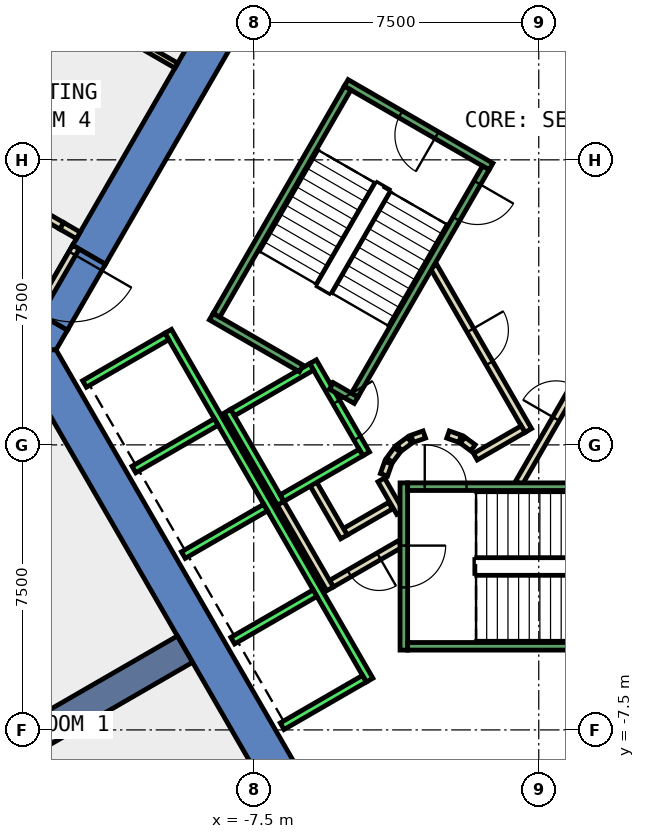
"""IFC4 building model, lengths in metres.
Left out: names, types, materials, properties, quantities, classifications, styles, units other than length and angle.
Written with IfcOpenShell. Run it as: python <this file> out.ifc"""

import sys

from ifc_helpers import new_model, si_unit, direction, frame, frame_2d, origin, place, context, subcontext, project, spatial, polyline, rectangle, outline, extrude, element, fill, save


model = new_model("IFC4")
c1 = context("Model", 3, precision=1e-05, world=origin(), true_north=direction((0.0, 1.0)))
c2 = subcontext(c1, "Body", "Model", "MODEL_VIEW")
j1 = project(units=[si_unit("LENGTHUNIT", "METRE"), si_unit("PLANEANGLEUNIT", "RADIAN")], contexts=[c1])
p1 = place(None, origin())
s1 = spatial("IfcSite", under=j1, at=p1, CompositionType="ELEMENT")
p2 = place(p1, origin())
s2 = spatial("IfcBuilding", under=s1, at=p2, CompositionType="ELEMENT")
p3 = place(p2, frame((0.0, 0.0, 39.2)))
s3 = spatial("IfcBuildingStorey", under=s2, at=p3, CompositionType="ELEMENT", Elevation=39.2)
p4 = place(p3, frame((0.0, 0.0, -0.4)))
e1 = element("IfcWall", 1, at=p4, inside=s3, PredefinedType="SHEAR", context=c2, shape_type="SweptSolid", body=[
    extrude(outline(polyline([(-12.267, 5.252), (-11.402, 4.752), (-6.351, 13.5), (-6.928, 14.5), (-12.267, 5.252)])), origin(), (0.0, 0.0, 1.0), 4.2),
])
p5 = place(p3, frame((0.0, 0.0, -0.4)))
e2 = element("IfcWall", 2, at=p5, inside=s3, PredefinedType="SHEAR", context=c2, shape_type="SweptSolid", body=[
    extrude(outline(polyline([(-12.402, 3.02), (-13.267, 3.52), (-13.856, 2.5), (-12.702, 2.5), (-12.402, 3.02)])), origin(), (0.0, 0.0, 1.0), 4.2),
])
p6 = place(p3, frame((0.0, 0.0, 3.6)))
e3 = element("IfcWall", 3, at=p6, inside=s3, PredefinedType="SHEAR", context=c2, shape_type="SweptSolid", body=[
    extrude(outline(polyline([(-13.267, 3.52), (-12.402, 3.02), (-11.402, 4.752), (-12.267, 5.252), (-13.267, 3.52)])), origin(), (0.0, 0.0, 1.0), 0.2),
])
p7 = place(p3, frame((0.0, 0.0, -0.4)))
e4 = element("IfcWall", 4, at=p7, inside=s3, PredefinedType="SHEAR", context=c2, shape_type="SweptSolid", body=[
    extrude(outline(polyline([(-13.856, 2.5), (-6.928, -9.5), (-6.351, -8.5), (-12.702, 2.5), (-13.856, 2.5)])), origin(), (0.0, 0.0, 1.0), 4.2),
])
p8 = place(p3, frame((-9.31, -5.375, -0.4), z_axis=(0.0, 0.0, 1.0), x_axis=(-0.866017533419, -0.500013631625, 0.0)))
e5 = element("IfcWall", 5, at=p8, inside=s3, PredefinedType="SHEAR", context=c2, shape_type="SweptSolid", body=[
    extrude(rectangle(XDim=9.0, YDim=0.8, at=frame_2d((4.5, 0.0))), origin(), (0.0, 0.0, 1.0), 4.2),
])
p9 = place(p3, frame((-15.963, 7.733, 0.0), z_axis=(0.0, 0.0, 1.0), x_axis=(0.865965832374, -0.500103166518, 0.0)))
e6 = element("IfcWall", 6, at=p9, inside=s3, PredefinedType="PARTITIONING", context=c2, shape_type="SweptSolid", body=[
    extrude(rectangle(XDim=3.941, YDim=0.2, at=frame_2d((1.971, 0.0))), origin(), (0.0, 0.0, 1.0), 3.8),
])
p10 = place(p3, frame((-3.9, -1.599, 0.0), z_axis=(0.0, 0.0, 1.0), x_axis=(-0.865969445389, -0.500096910261, 0.0)))
e7 = element("IfcWall", 7, at=p10, inside=s3, PredefinedType="PARTITIONING", context=c2, shape_type="SweptSolid", body=[
    extrude(rectangle(XDim=1.373, YDim=0.2, at=frame_2d((0.687, 0.0))), origin(), (0.0, 0.0, 1.0), 3.8),
])
p11 = place(p3, frame((-5.126, -2.422, 0.0), z_axis=(0.0, 0.0, 1.0), x_axis=(-0.500062241894, 0.865989465428, 0.0)))
e8 = element("IfcWall", 8, at=p11, inside=s3, PredefinedType="PARTITIONING", context=c2, shape_type="SweptSolid", body=[
    extrude(rectangle(XDim=1.7, YDim=0.2, at=frame_2d((0.85, 0.0))), origin(), (0.0, 0.0, 1.0), 3.8),
])
p12 = place(p3, frame((-3.65, -2.61, 0.0), z_axis=(0.0, 0.0, 1.0), x_axis=(-0.866072462134, -0.499918483688, 0.0)))
e9 = element("IfcWall", 9, at=p12, inside=s3, PredefinedType="PARTITIONING", context=c2, shape_type="SweptSolid", body=[
    extrude(rectangle(XDim=2.084, YDim=0.2, at=frame_2d((1.042, 0.0))), origin(), (0.0, 0.0, 1.0), 3.8),
])
p13 = place(p12, frame((0.642, 0.0, 0.0)))
e10 = element("IfcOpeningElement", 10, at=p13, cuts=e9, PredefinedType="OPENING", context=c2, shape_type="SweptSolid", body=[
    extrude(rectangle(XDim=0.9, YDim=2.1, at=frame_2d((0.45, 1.05))), frame((0.0, 0.11, 0.0), z_axis=(0.0, -1.0, 0.0), x_axis=(1.0, 0.0, 0.0)), (0.0, 0.0, 1.0), 0.22),
])
p14 = place(p3, frame((-5.492, -3.788, 0.0), z_axis=(0.0, 0.0, 1.0), x_axis=(-0.500008949224, 0.866020236886, 0.0)))
e11 = element("IfcWall", 11, at=p14, inside=s3, PredefinedType="PARTITIONING", context=c2, shape_type="SweptSolid", body=[
    extrude(rectangle(XDim=2.68, YDim=0.2, at=frame_2d((1.34, 0.0))), origin(), (0.0, 0.0, 1.0), 3.8),
])
p15 = place(p3, frame((-4.145, -0.92, 0.0), z_axis=(0.0, 0.0, 1.0), x_axis=(0.499743786207, -0.866173278362, 0.0)))
e12 = element("IfcWall", 12, at=p15, inside=s3, PredefinedType="PARTITIONING", context=c2, shape_type="SweptSolid", body=[
    extrude(rectangle(XDim=0.991, YDim=0.2, at=frame_2d((0.495, 0.0))), origin(), (0.0, 0.0, 1.0), 3.8),
])
p16 = place(p3, frame((-13.554, 12.3, 0.0), z_axis=(0.0, 0.0, 1.0), x_axis=(0.866028685375, -0.499994316075, 0.0)))
e13 = element("IfcWall", 13, at=p16, inside=s3, PredefinedType="PARTITIONING", context=c2, shape_type="SweptSolid", body=[
    extrude(rectangle(XDim=4.638, YDim=0.15, at=frame_2d((2.319, 0.0))), origin(), (0.0, 0.0, 1.0), 3.8),
])
p17 = place(p3, frame((-0.52, -1.0, 0.0), z_axis=(0.0, 0.0, 1.0), x_axis=(0.50011622646, 0.865958290007, 0.0)))
e14 = element("IfcWall", 14, at=p17, inside=s3, PredefinedType="PARTITIONING", context=c2, shape_type="SweptSolid", body=[
    extrude(rectangle(XDim=4.991, YDim=0.2, at=frame_2d((2.496, 0.0))), origin(), (0.0, 0.0, 1.0), 3.8),
])
p18 = place(p17, frame((1.945, 0.0, 0.0)))
e15 = element("IfcOpeningElement", 15, at=p18, cuts=e14, PredefinedType="OPENING", context=c2, shape_type="SweptSolid", body=[
    extrude(rectangle(XDim=1.0, YDim=2.1, at=frame_2d((0.5, 1.05))), frame((0.0, 0.11, 0.0), z_axis=(0.0, -1.0, 0.0), x_axis=(1.0, 0.0, 0.0)), (0.0, 0.0, 1.0), 0.22),
])
p19 = place(p3, frame((-2.771, 4.7, 0.0), z_axis=(0.0, 0.0, 1.0), x_axis=(0.499969479948, -0.866043023828, 0.0)))
e16 = element("IfcWall", 16, at=p19, inside=s3, PredefinedType="PARTITIONING", context=c2, shape_type="SweptSolid", body=[
    extrude(rectangle(XDim=4.99, YDim=0.2, at=frame_2d((2.495, 0.0))), origin(), (0.0, 0.0, 1.0), 3.8),
])
p20 = place(p19, frame((1.945, 0.0, 0.0)))
e17 = element("IfcOpeningElement", 17, at=p20, cuts=e16, PredefinedType="OPENING", context=c2, shape_type="SweptSolid", body=[
    extrude(rectangle(XDim=1.0, YDim=2.1, at=frame_2d((0.5, 1.05))), frame((0.0, 0.11, 0.0), z_axis=(0.0, -1.0, 0.0), x_axis=(1.0, 0.0, 0.0)), (0.0, 0.0, 1.0), 0.22),
])
p21 = place(p3, frame((-0.412, 0.414, 0.0), z_axis=(0.0, 0.0, 1.0), x_axis=(-0.866017369001, -0.500013916395, 0.0)))
e18 = element("IfcWall", 18, at=p21, inside=s3, PredefinedType="PARTITIONING", context=c2, shape_type="SweptSolid", body=[
    extrude(rectangle(XDim=1.45, YDim=0.2, at=frame_2d((0.725, 0.0))), origin(), (0.0, 0.0, 1.0), 3.8),
])
p22 = place(p3, frame((-1.731, -0.077, 0.0), z_axis=(0.0, 0.0, 1.0), x_axis=(-0.804311165252, 0.594208338422, 0.0)))
e19 = element("IfcWall", 19, at=p22, inside=s3, PredefinedType="PARTITIONING", context=c2, shape_type="SweptSolid", body=[
    extrude(rectangle(XDim=0.338, YDim=0.2, at=frame_2d((0.169, 0.0))), origin(), (0.0, 0.0, 1.0), 3.8),
])
p23 = place(p3, frame((-2.07, 0.16, 0.0), z_axis=(0.0, 0.0, 1.0), x_axis=(-0.942199461132, 0.335052496547, 0.0)))
e20 = element("IfcWall", 20, at=p23, inside=s3, PredefinedType="PARTITIONING", context=c2, shape_type="SweptSolid", body=[
    extrude(rectangle(XDim=0.337, YDim=0.2, at=frame_2d((0.169, 0.0))), origin(), (0.0, 0.0, 1.0), 3.8),
])
p24 = place(p3, frame((-3.012, 0.273, 0.0), z_axis=(0.0, 0.0, 1.0), x_axis=(-0.942280615813, -0.334824194261, 0.0)))
e21 = element("IfcWall", 21, at=p24, inside=s3, PredefinedType="PARTITIONING", context=c2, shape_type="SweptSolid", body=[
    extrude(rectangle(XDim=0.338, YDim=0.2, at=frame_2d((0.169, 0.0))), origin(), (0.0, 0.0, 1.0), 3.8),
])
p25 = place(p3, frame((-3.397, 0.124, 0.0), z_axis=(0.0, 0.0, 1.0), x_axis=(-0.804311165252, -0.594208338422, 0.0)))
e22 = element("IfcWall", 22, at=p25, inside=s3, PredefinedType="PARTITIONING", context=c2, shape_type="SweptSolid", body=[
    extrude(rectangle(XDim=0.338, YDim=0.2, at=frame_2d((0.169, 0.0))), origin(), (0.0, 0.0, 1.0), 3.8),
])
p26 = place(p3, frame((-3.723, -0.131, 0.0), z_axis=(0.0, 0.0, 1.0), x_axis=(-0.594675113454, -0.803966112121, 0.0)))
e23 = element("IfcWall", 23, at=p26, inside=s3, PredefinedType="PARTITIONING", context=c2, shape_type="SweptSolid", body=[
    extrude(rectangle(XDim=0.338, YDim=0.2, at=frame_2d((0.169, 0.0))), origin(), (0.0, 0.0, 1.0), 3.8),
])
p27 = place(p3, frame((-3.96, -0.47, 0.0), z_axis=(0.0, 0.0, 1.0), x_axis=(-0.334824194261, -0.942280615813, 0.0)))
e24 = element("IfcWall", 24, at=p27, inside=s3, PredefinedType="PARTITIONING", context=c2, shape_type="SweptSolid", body=[
    extrude(rectangle(XDim=0.338, YDim=0.2, at=frame_2d((0.169, 0.0))), origin(), (0.0, 0.0, 1.0), 3.8),
])
p28 = place(p3, frame((-12.18, 5.202, 0.0), z_axis=(0.0, 0.0, 1.0), x_axis=(-0.50002537861, -0.866010750942, 0.0)))
e25 = element("IfcWall", 25, at=p28, inside=s3, PredefinedType="PARTITIONING", context=c2, shape_type="SweptSolid", body=[
    extrude(rectangle(XDim=2.0, YDim=0.2, at=frame_2d((1.0, 0.0))), origin(), (0.0, 0.0, 1.0), 2.4),
])
p29 = place(p28, frame((0.19, 0.0, 0.0)))
e26 = element("IfcOpeningElement", 26, at=p29, cuts=e25, PredefinedType="OPENING", context=c2, shape_type="SweptSolid", body=[
    extrude(rectangle(XDim=1.8, YDim=2.1, at=frame_2d((0.9, 1.05))), frame((0.0, 0.11, 0.0), z_axis=(0.0, -1.0, 0.0), x_axis=(1.0, 0.0, 0.0)), (0.0, 0.0, 1.0), 0.22),
])
p30 = place(p3, frame((-12.55, 5.762, 0.0), z_axis=(0.0, 0.0, 1.0), x_axis=(0.866071776036, -0.499919672301, 0.0)))
e27 = element("IfcWall", 27, at=p30, inside=s3, PredefinedType="PARTITIONING", context=c2, shape_type="SweptSolid", body=[
    extrude(rectangle(XDim=0.5, YDim=0.2, at=frame_2d((0.25, 0.0))), origin(), (0.0, 0.0, 1.0), 2.4),
])
p31 = place(p3, frame((-5.94, 2.188, 0.0), z_axis=(0.0, 0.0, 1.0), x_axis=(0.49994636267, -0.866056369097, 0.0)))
e28 = element("IfcWall", 28, at=p31, inside=s3, PredefinedType="STANDARD", context=c2, shape_type="SweptSolid", body=[
    extrude(rectangle(XDim=2.8, YDim=0.2, at=frame_2d((1.4, 0.0))), origin(), (0.0, 0.0, 1.0), 3.8),
])
p32 = place(p31, frame((1.225, 0.0, 0.0)))
e29 = element("IfcOpeningElement", 29, at=p32, cuts=e28, PredefinedType="OPENING", context=c2, shape_type="SweptSolid", body=[
    extrude(rectangle(XDim=1.1, YDim=2.1, at=frame_2d((0.55, 1.05))), frame((0.0, 0.11, 0.0), z_axis=(0.0, -1.0, 0.0), x_axis=(1.0, 0.0, 0.0)), (0.0, 0.0, 1.0), 0.22),
])
p33 = place(p3, frame((-8.192, 0.888, 0.0), z_axis=(0.0, 0.0, 1.0), x_axis=(0.49994636267, -0.866056369097, 0.0)))
e30 = element("IfcWall", 30, at=p33, inside=s3, PredefinedType="STANDARD", context=c2, shape_type="SweptSolid", body=[
    extrude(rectangle(XDim=2.8, YDim=0.2, at=frame_2d((1.4, 0.0))), origin(), (0.0, 0.0, 1.0), 3.8),
])
for number, where, z_axis, x_axis in (
    (31, (-5.977, 2.052, 0.0), (0.0, 0.0, 1.0), (-0.866, -0.5, 0.0)),
    (32, (-4.677, -0.2, 0.0), (0.0, 0.0, 1.0), (-0.866, -0.5, 0.0)),
):
    element("IfcWall", number, at=place(p3, frame(where, z_axis=z_axis, x_axis=x_axis)), inside=s3, PredefinedType="STANDARD", context=c2, shape_type="SweptSolid", body=[
        extrude(rectangle(XDim=2.399, YDim=0.2, at=frame_2d((1.2, 0.0))), origin(), (0.0, 0.0, 1.0), 3.8),
    ])
p34 = place(p3, frame((-9.751, 2.99, 0.0), z_axis=(0.0, 0.0, 1.0), x_axis=(0.50000090737, -0.866024879913, 0.0)))
e33 = element("IfcWall", 33, at=p34, inside=s3, PredefinedType="STANDARD", context=c2, shape_type="SweptSolid", body=[
    extrude(rectangle(XDim=10.6, YDim=0.2, at=frame_2d((5.3, 0.0))), origin(), (0.0, 0.0, 1.0), 3.8),
])
p35 = place(p3, frame((-9.788, 2.853, 0.0), z_axis=(0.0, 0.0, 1.0), x_axis=(-0.865998541277, -0.500046524342, 0.0)))
e34 = element("IfcWall", 34, at=p35, inside=s3, PredefinedType="STANDARD", context=c2, shape_type="SweptSolid", body=[
    extrude(rectangle(XDim=2.5, YDim=0.2, at=frame_2d((1.25, 0.0))), origin(), (0.0, 0.0, 1.0), 3.8),
])
for number, where, z_axis, x_axis in (
    (35, (-8.488, 0.602, 0.0), (0.0, 0.0, 1.0), (-0.866, -0.5, 0.0)),
    (36, (-7.188, -1.65, 0.0), (0.0, 0.0, 1.0), (-0.866, -0.5, 0.0)),
    (37, (-5.888, -3.902, 0.0), (0.0, 0.0, 1.0), (-0.866, -0.5, 0.0)),
    (38, (-4.588, -6.153, 0.0), (0.0, 0.0, 1.0), (-0.866, -0.5, 0.0)),
):
    element("IfcWall", number, at=place(p3, frame(where, z_axis=z_axis, x_axis=x_axis)), inside=s3, PredefinedType="STANDARD", context=c2, shape_type="SweptSolid", body=[
        extrude(rectangle(XDim=2.5, YDim=0.2, at=frame_2d((1.25, 0.0))), origin(), (0.0, 0.0, 1.0), 3.8),
    ])
p36 = place(p3, frame((-3.55, -1.0, 0.0), z_axis=(0.0, 0.0, 1.0), x_axis=(0.0, -1.0, 0.0)))
e39 = element("IfcWall", 39, at=p36, inside=s3, PredefinedType="STANDARD", context=c2, shape_type="SweptSolid", body=[
    extrude(rectangle(XDim=4.4, YDim=0.2, at=frame_2d((2.2, 0.0))), origin(), (0.0, 0.0, 1.0), 3.8),
])
p37 = place(p36, frame((1.65, 0.0, 0.0)))
e40 = element("IfcOpeningElement", 40, at=p37, cuts=e39, PredefinedType="OPENING", context=c2, shape_type="SweptSolid", body=[
    extrude(rectangle(XDim=1.1, YDim=2.2, at=frame_2d((0.55, 1.1))), frame((0.0, 0.11, 0.0), z_axis=(0.0, -1.0, 0.0), x_axis=(1.0, 0.0, 0.0)), (0.0, 0.0, 1.0), 0.22),
])
p38 = place(p3, frame((-3.45, -1.1, 0.0), z_axis=(0.0, 0.0, 1.0), x_axis=(1.0, 0.0, 0.0)))
e41 = element("IfcWall", 41, at=p38, inside=s3, PredefinedType="STANDARD", context=c2, shape_type="SweptSolid", body=[
    extrude(rectangle(XDim=6.9, YDim=0.2, at=frame_2d((3.45, 0.0))), origin(), (0.0, 0.0, 1.0), 3.8),
])
p39 = place(p38, frame((0.45, 0.0, 0.0)))
e42 = element("IfcOpeningElement", 42, at=p39, cuts=e41, PredefinedType="OPENING", context=c2, shape_type="SweptSolid", body=[
    extrude(rectangle(XDim=1.1, YDim=2.2, at=frame_2d((0.55, 1.1))), frame((0.0, 0.11, 0.0), z_axis=(0.0, -1.0, 0.0), x_axis=(1.0, 0.0, 0.0)), (0.0, 0.0, 1.0), 0.22),
])
p40 = place(p3, frame((-3.45, -5.3, 0.0), z_axis=(0.0, 0.0, 1.0), x_axis=(1.0, 0.0, 0.0)))
e43 = element("IfcWall", 43, at=p40, inside=s3, PredefinedType="STANDARD", context=c2, shape_type="SweptSolid", body=[
    extrude(rectangle(XDim=6.9, YDim=0.2, at=frame_2d((3.45, 0.0))), origin(), (0.0, 0.0, 1.0), 3.8),
])
p41 = place(p3, frame((-1.256, 7.324, 0.0), z_axis=(0.0, 0.0, 1.0), x_axis=(-0.866046073146, 0.499964197906, 0.0)))
e44 = element("IfcWall", 44, at=p41, inside=s3, PredefinedType="STANDARD", context=c2, shape_type="SweptSolid", body=[
    extrude(rectangle(XDim=4.4, YDim=0.2, at=frame_2d((2.2, 0.0))), origin(), (0.0, 0.0, 1.0), 3.8),
])
p42 = place(p41, frame((1.65, 0.0, 0.0)))
e45 = element("IfcOpeningElement", 45, at=p42, cuts=e44, PredefinedType="OPENING", context=c2, shape_type="SweptSolid", body=[
    extrude(rectangle(XDim=1.1, YDim=2.2, at=frame_2d((0.55, 1.1))), frame((0.0, 0.11, 0.0), z_axis=(0.0, -1.0, 0.0), x_axis=(1.0, 0.0, 0.0)), (0.0, 0.0, 1.0), 0.22),
])
p43 = place(p3, frame((-6.25, 2.01, 0.0), z_axis=(0.0, 0.0, 1.0), x_axis=(-0.86611865017, 0.499838457731, 0.0)))
e46 = element("IfcWall", 46, at=p43, inside=s3, PredefinedType="STANDARD", context=c2, shape_type="SweptSolid", body=[
    extrude(rectangle(XDim=2.733, YDim=0.2, at=frame_2d((1.366, 0.0))), origin(), (0.0, 0.0, 1.0), 3.8),
])
p44 = place(p3, frame((-4.806, 1.176, 0.0), z_axis=(0.0, 0.0, 1.0), x_axis=(-0.866558586415, 0.499075361355, 0.0)))
e47 = element("IfcWall", 47, at=p44, inside=s3, PredefinedType="STANDARD", context=c2, shape_type="SweptSolid", body=[
    extrude(rectangle(XDim=0.751, YDim=0.2, at=frame_2d((0.376, 0.0))), origin(), (0.0, 0.0, 1.0), 3.8),
])
p45 = place(p3, frame((-1.393, 7.288, 0.0), z_axis=(0.0, 0.0, 1.0), x_axis=(-0.499963383562, -0.866046543262, 0.0)))
e48 = element("IfcWall", 48, at=p45, inside=s3, PredefinedType="STANDARD", context=c2, shape_type="SweptSolid", body=[
    extrude(rectangle(XDim=6.9, YDim=0.2, at=frame_2d((3.45, 0.0))), origin(), (0.0, 0.0, 1.0), 3.8),
])
p46 = place(p45, frame((0.45, 0.0, 0.0)))
e49 = element("IfcOpeningElement", 49, at=p46, cuts=e48, PredefinedType="OPENING", context=c2, shape_type="SweptSolid", body=[
    extrude(rectangle(XDim=1.1, YDim=2.2, at=frame_2d((0.55, 1.1))), frame((0.0, 0.11, 0.0), z_axis=(0.0, -1.0, 0.0), x_axis=(1.0, 0.0, 0.0)), (0.0, 0.0, 1.0), 0.22),
])
p47 = place(p3, frame((-5.03, 9.388, 0.0), z_axis=(0.0, 0.0, 1.0), x_axis=(-0.499978703459, -0.866037698999, 0.0)))
e50 = element("IfcWall", 50, at=p47, inside=s3, PredefinedType="STANDARD", context=c2, shape_type="SweptSolid", body=[
    extrude(rectangle(XDim=6.9, YDim=0.2, at=frame_2d((3.45, 0.0))), origin(), (0.0, 0.0, 1.0), 3.8),
])
p48 = place(p18, origin())
e51 = element("IfcDoor", 51, at=p48, inside=s3, OperationType="SINGLE_SWING_LEFT", PredefinedType="DOOR", context=c2, shape_type="SweptSolid", body=[
    extrude(rectangle(XDim=1.0, YDim=2.1, at=frame_2d((0.5, 1.05))), frame((0.0, 0.025, 0.0), z_axis=(0.0, -1.0, 0.0), x_axis=(1.0, 0.0, 0.0)), (0.0, 0.0, 1.0), 0.05),
])
fill(e15, e51)
p49 = place(p20, origin())
e52 = element("IfcDoor", 52, at=p49, inside=s3, OperationType="SINGLE_SWING_RIGHT", PredefinedType="DOOR", context=c2, shape_type="SweptSolid", body=[
    extrude(rectangle(XDim=1.0, YDim=2.1, at=frame_2d((0.5, 1.05))), frame((0.0, 0.025, 0.0), z_axis=(0.0, -1.0, 0.0), x_axis=(1.0, 0.0, 0.0)), (0.0, 0.0, 1.0), 0.05),
])
fill(e17, e52)
p50 = place(p13, origin())
e53 = element("IfcDoor", 53, at=p50, inside=s3, OperationType="SINGLE_SWING_LEFT", PredefinedType="DOOR", context=c2, shape_type="SweptSolid", body=[
    extrude(rectangle(XDim=0.9, YDim=2.1, at=frame_2d((0.45, 1.05))), frame((0.0, 0.025, 0.0), z_axis=(0.0, -1.0, 0.0), x_axis=(1.0, 0.0, 0.0)), (0.0, 0.0, 1.0), 0.05),
])
fill(e10, e53)
p51 = place(p29, origin())
e54 = element("IfcDoor", 54, at=p51, inside=s3, OperationType="DOUBLE_DOOR_SINGLE_SWING", PredefinedType="DOOR", context=c2, shape_type="SweptSolid", body=[
    extrude(rectangle(XDim=1.8, YDim=2.1, at=frame_2d((0.9, 1.05))), frame((0.0, 0.025, 0.0), z_axis=(0.0, -1.0, 0.0), x_axis=(1.0, 0.0, 0.0)), (0.0, 0.0, 1.0), 0.05),
])
fill(e26, e54)
p52 = place(p32, origin())
e55 = element("IfcDoor", 55, at=p52, inside=s3, OperationType="SLIDING_TO_LEFT", PredefinedType="DOOR", context=c2, shape_type="SweptSolid", body=[
    extrude(rectangle(XDim=1.1, YDim=2.1, at=frame_2d((0.55, 1.05))), frame((0.0, 0.025, 0.0), z_axis=(0.0, -1.0, 0.0), x_axis=(1.0, 0.0, 0.0)), (0.0, 0.0, 1.0), 0.05),
])
fill(e29, e55)
p53 = place(p39, origin())
e56 = element("IfcDoor", 56, at=p53, inside=s3, OperationType="SINGLE_SWING_LEFT", PredefinedType="DOOR", context=c2, shape_type="SweptSolid", body=[
    extrude(rectangle(XDim=1.1, YDim=2.2, at=frame_2d((0.55, 1.1))), frame((0.0, 0.025, 0.0), z_axis=(0.0, -1.0, 0.0), x_axis=(1.0, 0.0, 0.0)), (0.0, 0.0, 1.0), 0.05),
])
fill(e42, e56)
p54 = place(p37, origin())
e57 = element("IfcDoor", 57, at=p54, inside=s3, OperationType="SINGLE_SWING_LEFT", PredefinedType="DOOR", context=c2, shape_type="SweptSolid", body=[
    extrude(rectangle(XDim=1.1, YDim=2.2, at=frame_2d((0.55, 1.1))), frame((0.0, 0.025, 0.0), z_axis=(0.0, -1.0, 0.0), x_axis=(1.0, 0.0, 0.0)), (0.0, 0.0, 1.0), 0.05),
])
fill(e40, e57)
p55 = place(p46, origin())
e58 = element("IfcDoor", 58, at=p55, inside=s3, OperationType="SINGLE_SWING_LEFT", PredefinedType="DOOR", context=c2, shape_type="SweptSolid", body=[
    extrude(rectangle(XDim=1.1, YDim=2.2, at=frame_2d((0.55, 1.1))), frame((0.0, 0.025, 0.0), z_axis=(0.0, -1.0, 0.0), x_axis=(1.0, 0.0, 0.0)), (0.0, 0.0, 1.0), 0.05),
])
fill(e49, e58)
p56 = place(p42, origin())
e59 = element("IfcDoor", 59, at=p56, inside=s3, OperationType="SINGLE_SWING_LEFT", PredefinedType="DOOR", context=c2, shape_type="SweptSolid", body=[
    extrude(rectangle(XDim=1.1, YDim=2.2, at=frame_2d((0.55, 1.1))), frame((0.0, 0.025, 0.0), z_axis=(0.0, -1.0, 0.0), x_axis=(1.0, 0.0, 0.0)), (0.0, 0.0, 1.0), 0.05),
])
fill(e45, e59)
save(model, sys.argv[1])
